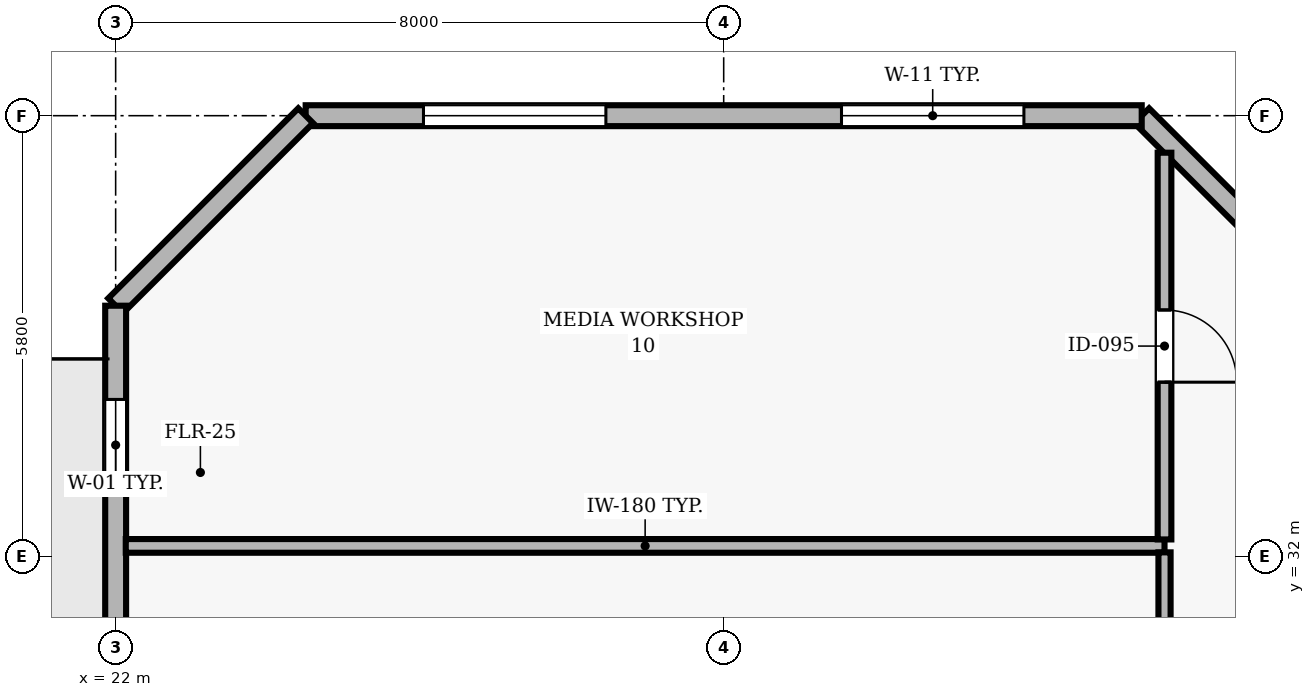
"""IFC4 building model, lengths in metres.
Left out: names, types, materials, properties, quantities, classifications, styles, units other than length and angle.
Written with IfcOpenShell. Run it as: python <this file> out.ifc"""

import sys

from ifc_helpers import new_model, si_unit, direction, frame, frame_2d, origin, place, context, subcontext, project, spatial, rectangle, extrude, element, fill, save


model = new_model("IFC4")
c1 = context("Model", 3, precision=1e-05, world=origin(), true_north=direction((0.0, 1.0)))
c2 = subcontext(c1, "Body", "Model", "MODEL_VIEW")
j1 = project(units=[si_unit("LENGTHUNIT", "METRE"), si_unit("PLANEANGLEUNIT", "RADIAN")], contexts=[c1])
p1 = place(None, origin())
s1 = spatial("IfcSite", under=j1, at=p1, CompositionType="ELEMENT")
p2 = place(p1, origin())
s2 = spatial("IfcBuilding", under=s1, at=p2, CompositionType="ELEMENT")
p3 = place(p2, frame((0.0, 0.0, 295.0)))
s3 = spatial("IfcBuildingStorey", under=s2, at=p3, CompositionType="ELEMENT", Elevation=295.0)
p4 = place(p3, frame((38.0, 35.3, 0.0), z_axis=(0.0, 0.0, 1.0), x_axis=(-0.707106781187, 0.707106781187, 0.0)))
e1 = element("IfcWall", 1, at=p4, inside=s3, PredefinedType="SOLIDWALL", context=c2, shape_type="SweptSolid", body=[
    extrude(rectangle(XDim=3.536, YDim=0.275, at=frame_2d((1.768, 0.0))), origin(), (0.0, 0.0, 1.0), 3.69),
])
p5 = place(p3, frame((35.5, 37.8, 0.0), z_axis=(0.0, 0.0, 1.0), x_axis=(-1.0, 0.0, 0.0)))
e2 = element("IfcWall", 2, at=p5, inside=s3, PredefinedType="SOLIDWALL", context=c2, shape_type="SweptSolid", body=[
    extrude(rectangle(XDim=11.0, YDim=0.275, at=frame_2d((5.5, 0.0))), origin(), (0.0, 0.0, 1.0), 3.69),
])
p6 = place(p5, frame((1.55, 0.0, 0.9)))
e3 = element("IfcOpeningElement", 3, at=p6, cuts=e2, PredefinedType="OPENING", context=c2, shape_type="SweptSolid", body=[
    extrude(rectangle(XDim=2.4, YDim=2.2, at=frame_2d((1.2, 1.1))), frame((0.0, 0.147, 0.0), z_axis=(0.0, -1.0, 0.0), x_axis=(1.0, 0.0, 0.0)), (0.0, 0.0, 1.0), 0.295),
])
p7 = place(p5, frame((7.05, 0.0, 0.9)))
e4 = element("IfcOpeningElement", 4, at=p7, cuts=e2, PredefinedType="OPENING", context=c2, shape_type="SweptSolid", body=[
    extrude(rectangle(XDim=2.4, YDim=2.2, at=frame_2d((1.2, 1.1))), frame((0.0, 0.147, 0.0), z_axis=(0.0, -1.0, 0.0), x_axis=(1.0, 0.0, 0.0)), (0.0, 0.0, 1.0), 0.295),
])
p8 = place(p3, frame((24.5, 37.8, 0.0), z_axis=(0.0, 0.0, 1.0), x_axis=(-0.707106781187, -0.707106781187, 0.0)))
e5 = element("IfcWall", 5, at=p8, inside=s3, PredefinedType="SOLIDWALL", context=c2, shape_type="SweptSolid", body=[
    extrude(rectangle(XDim=3.536, YDim=0.275, at=frame_2d((1.768, 0.0))), origin(), (0.0, 0.0, 1.0), 3.69),
])
p9 = place(p3, frame((22.0, 35.3, 0.0), z_axis=(0.0, 0.0, 1.0), x_axis=(0.0, -1.0, 0.0)))
e6 = element("IfcWall", 6, at=p9, inside=s3, PredefinedType="SOLIDWALL", context=c2, shape_type="SweptSolid", body=[
    extrude(rectangle(XDim=32.8, YDim=0.275, at=frame_2d((16.4, 0.0))), origin(), (0.0, 0.0, 1.0), 3.69),
])
p10 = place(p9, frame((7.3, 0.0, 0.0)))
e7 = element("IfcOpeningElement", 7, at=p10, cuts=e6, PredefinedType="OPENING", context=c2, shape_type="SweptSolid", body=[
    extrude(rectangle(XDim=1.0, YDim=2.2, at=frame_2d((0.5, 1.1))), frame((0.0, 0.147, 0.0), z_axis=(0.0, -1.0, 0.0), x_axis=(1.0, 0.0, 0.0)), (0.0, 0.0, 1.0), 0.295),
])
p11 = place(p9, frame((1.233, 0.0, 0.9)))
e8 = element("IfcOpeningElement", 8, at=p11, cuts=e6, PredefinedType="OPENING", context=c2, shape_type="SweptSolid", body=[
    extrude(rectangle(XDim=1.2, YDim=1.6, at=frame_2d((0.6, 0.8))), frame((0.0, 0.147, 0.0), z_axis=(0.0, -1.0, 0.0), x_axis=(1.0, 0.0, 0.0)), (0.0, 0.0, 1.0), 0.295),
])
p12 = place(p9, frame((13.067, 0.0, 0.9)))
e9 = element("IfcOpeningElement", 9, at=p12, cuts=e6, PredefinedType="OPENING", context=c2, shape_type="SweptSolid", body=[
    extrude(rectangle(XDim=1.2, YDim=1.6, at=frame_2d((0.6, 0.8))), frame((0.0, 0.147, 0.0), z_axis=(0.0, -1.0, 0.0), x_axis=(1.0, 0.0, 0.0)), (0.0, 0.0, 1.0), 0.295),
])
p13 = place(p9, frame((18.533, 0.0, 0.9)))
e10 = element("IfcOpeningElement", 10, at=p13, cuts=e6, PredefinedType="OPENING", context=c2, shape_type="SweptSolid", body=[
    extrude(rectangle(XDim=1.2, YDim=1.6, at=frame_2d((0.6, 0.8))), frame((0.0, 0.147, 0.0), z_axis=(0.0, -1.0, 0.0), x_axis=(1.0, 0.0, 0.0)), (0.0, 0.0, 1.0), 0.295),
])
p14 = place(p9, frame((24.0, 0.0, 0.9)))
e11 = element("IfcOpeningElement", 11, at=p14, cuts=e6, PredefinedType="OPENING", context=c2, shape_type="SweptSolid", body=[
    extrude(rectangle(XDim=1.2, YDim=1.6, at=frame_2d((0.6, 0.8))), frame((0.0, 0.147, 0.0), z_axis=(0.0, -1.0, 0.0), x_axis=(1.0, 0.0, 0.0)), (0.0, 0.0, 1.0), 0.295),
])
p15 = place(p9, frame((28.567, 0.0, 0.9)))
e12 = element("IfcOpeningElement", 12, at=p15, cuts=e6, PredefinedType="OPENING", context=c2, shape_type="SweptSolid", body=[
    extrude(rectangle(XDim=1.2, YDim=1.6, at=frame_2d((0.6, 0.8))), frame((0.0, 0.147, 0.0), z_axis=(0.0, -1.0, 0.0), x_axis=(1.0, 0.0, 0.0)), (0.0, 0.0, 1.0), 0.295),
])
p16 = place(p3, frame((35.8, 32.14, 0.0), z_axis=(0.0, 0.0, 1.0), x_axis=(-1.0, 0.0, 0.0)))
e13 = element("IfcWall", 13, at=p16, inside=s3, PredefinedType="PARTITIONING", context=c2, shape_type="SweptSolid", body=[
    extrude(rectangle(XDim=13.667, YDim=0.18, at=frame_2d((6.833, 0.0))), origin(), (0.0, 0.0, 1.0), 3.69),
])
p17 = place(p3, frame((35.8, 32.055, 0.0), z_axis=(0.0, 0.0, 1.0), x_axis=(0.0, -1.0, 0.0)))
e14 = element("IfcWall", 14, at=p17, inside=s3, PredefinedType="PARTITIONING", context=c2, shape_type="SweptSolid", body=[
    extrude(rectangle(XDim=2.927, YDim=0.16, at=frame_2d((1.463, 0.0))), origin(), (0.0, 0.0, 1.0), 3.69),
])
p18 = place(p17, frame((1.013, 0.0, 0.0)))
e15 = element("IfcOpeningElement", 15, at=p18, cuts=e14, PredefinedType="OPENING", context=c2, shape_type="SweptSolid", body=[
    extrude(rectangle(XDim=0.9, YDim=2.1, at=frame_2d((0.45, 1.05))), frame((0.0, 0.09, 0.0), z_axis=(0.0, -1.0, 0.0), x_axis=(1.0, 0.0, 0.0)), (0.0, 0.0, 1.0), 0.18),
])
p19 = place(p3, frame((35.8, 37.313, 0.0), z_axis=(0.0, 0.0, 1.0), x_axis=(0.0, -1.0, 0.0)))
e16 = element("IfcWall", 16, at=p19, inside=s3, PredefinedType="PARTITIONING", context=c2, shape_type="SweptSolid", body=[
    extrude(rectangle(XDim=5.088, YDim=0.18, at=frame_2d((2.544, 0.0))), origin(), (0.0, 0.0, 1.0), 3.69),
])
p20 = place(p19, frame((2.069, 0.0, 0.0)))
e17 = element("IfcOpeningElement", 17, at=p20, cuts=e16, PredefinedType="OPENING", context=c2, shape_type="SweptSolid", body=[
    extrude(rectangle(XDim=0.95, YDim=2.1, at=frame_2d((0.475, 1.05))), frame((0.0, 0.1, 0.0), z_axis=(0.0, -1.0, 0.0), x_axis=(1.0, 0.0, 0.0)), (0.0, 0.0, 1.0), 0.2),
])
p21 = place(p6, origin())
e18 = element("IfcWindow", 18, at=p21, inside=s3, PartitioningType="SINGLE_PANEL", PredefinedType="WINDOW", context=c2, shape_type="SweptSolid", body=[
    extrude(rectangle(XDim=2.4, YDim=2.2, at=frame_2d((1.2, 1.1))), frame((0.0, 0.03, 0.0), z_axis=(0.0, -1.0, 0.0), x_axis=(1.0, 0.0, 0.0)), (0.0, 0.0, 1.0), 0.06),
])
fill(e3, e18)
p22 = place(p7, origin())
e19 = element("IfcWindow", 19, at=p22, inside=s3, PartitioningType="SINGLE_PANEL", PredefinedType="WINDOW", context=c2, shape_type="SweptSolid", body=[
    extrude(rectangle(XDim=2.4, YDim=2.2, at=frame_2d((1.2, 1.1))), frame((0.0, 0.03, 0.0), z_axis=(0.0, -1.0, 0.0), x_axis=(1.0, 0.0, 0.0)), (0.0, 0.0, 1.0), 0.06),
])
fill(e4, e19)
p23 = place(p11, origin())
e20 = element("IfcWindow", 20, at=p23, inside=s3, PartitioningType="SINGLE_PANEL", PredefinedType="WINDOW", context=c2, shape_type="SweptSolid", body=[
    extrude(rectangle(XDim=1.2, YDim=1.6, at=frame_2d((0.6, 0.8))), frame((0.0, 0.03, 0.0), z_axis=(0.0, -1.0, 0.0), x_axis=(1.0, 0.0, 0.0)), (0.0, 0.0, 1.0), 0.06),
])
fill(e8, e20)
p24 = place(p20, origin())
e21 = element("IfcDoor", 21, at=p24, inside=s3, OperationType="SINGLE_SWING_RIGHT", PredefinedType="DOOR", context=c2, shape_type="SweptSolid", body=[
    extrude(rectangle(XDim=0.95, YDim=2.1, at=frame_2d((0.475, 1.05))), frame((0.0, 0.025, 0.0), z_axis=(0.0, -1.0, 0.0), x_axis=(1.0, 0.0, 0.0)), (0.0, 0.0, 1.0), 0.05),
])
fill(e17, e21)
save(model, sys.argv[1])
